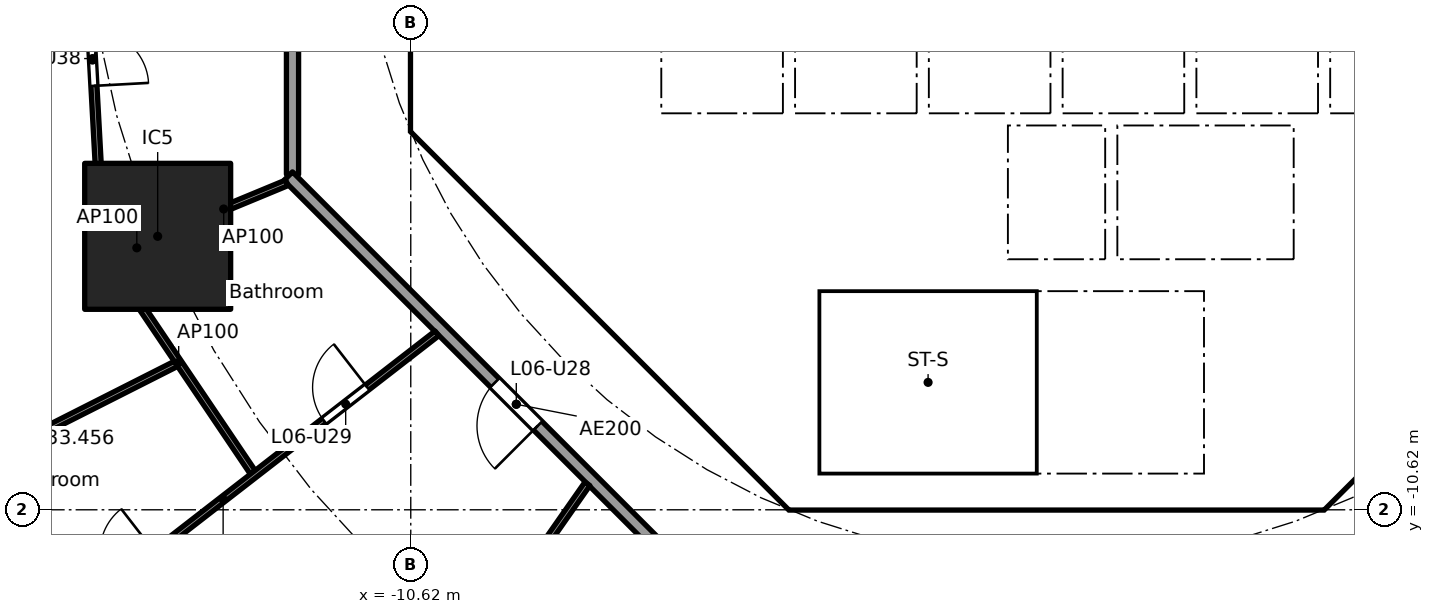
"""IFC4 building model, lengths in metres.
Left out: names, types, materials, properties, quantities, classifications, styles, units other than length and angle.
Written with IfcOpenShell. Run it as: python <this file> out.ifc"""

import sys

from ifc_helpers import new_model, si_unit, direction, frame, frame_2d, origin, origin_2d, place, context, subcontext, project, spatial, polyline, rectangle, outline, extrude, element, fill, save


model = new_model("IFC4")
c1 = context("Model", 3, precision=1e-05, world=origin(), true_north=direction((0.0, 1.0)))
c2 = subcontext(c1, "Body", "Model", "MODEL_VIEW")
j1 = project(units=[si_unit("LENGTHUNIT", "METRE"), si_unit("PLANEANGLEUNIT", "RADIAN")], contexts=[c1])
p1 = place(None, origin())
s1 = spatial("IfcSite", under=j1, at=p1, CompositionType="ELEMENT")
p2 = place(p1, origin())
s2 = spatial("IfcBuilding", under=s1, at=p2, CompositionType="ELEMENT")
p3 = place(p2, frame((0.0, 0.0, 30.7)))
s3 = spatial("IfcBuildingStorey", under=s2, at=p3, CompositionType="ELEMENT", Elevation=30.7)
p4 = place(p3, frame((-14.782, -6.123, 0.0), z_axis=(0.0, 0.0, 1.0), x_axis=(1.0, 0.0, 0.0)))
e1 = element("IfcColumn", 1, at=p4, inside=s3, PredefinedType="COLUMN", context=c2, shape_type="SweptSolid", body=[
    extrude(rectangle(XDim=2.4, YDim=2.4, at=origin_2d()), origin(), (0.0, 0.0, 1.0), 3.7),
])
p5 = place(p3, frame((-10.325, 3.801, 0.0), z_axis=(0.0, 0.0, 1.0), x_axis=(0.0, -1.0, 0.0)))
e2 = element("IfcWall", 2, at=p5, inside=s3, PredefinedType="SHEAR", context=c2, shape_type="SweptSolid", body=[
    extrude(rectangle(XDim=7.602, YDim=0.6, at=frame_2d((3.801, 0.0))), origin(), (0.0, 0.0, 1.0), 3.44),
])
p6 = place(p5, frame((0.651, 0.0, 0.0)))
e3 = element("IfcOpeningElement", 3, at=p6, cuts=e2, PredefinedType="OPENING", context=c2, shape_type="SweptSolid", body=[
    extrude(rectangle(XDim=1.5, YDim=2.1, at=frame_2d((0.75, 1.05))), frame((0.0, 0.31, 0.0), z_axis=(0.0, -1.0, 0.0), x_axis=(1.0, 0.0, 0.0)), (0.0, 0.0, 1.0), 0.62),
])
p7 = place(p5, frame((5.451, 0.0, 0.0)))
e4 = element("IfcOpeningElement", 4, at=p7, cuts=e2, PredefinedType="OPENING", context=c2, shape_type="SweptSolid", body=[
    extrude(rectangle(XDim=1.5, YDim=2.1, at=frame_2d((0.75, 1.05))), frame((0.0, 0.31, 0.0), z_axis=(0.0, -1.0, 0.0), x_axis=(1.0, 0.0, 0.0)), (0.0, 0.0, 1.0), 0.62),
])
p8 = place(p3, frame((-9.988, -4.613, 0.0), z_axis=(0.0, 0.0, 1.0), x_axis=(0.707106781187, -0.707106781187, 0.0)))
e5 = element("IfcWall", 5, at=p8, inside=s3, PredefinedType="SHEAR", context=c2, shape_type="SweptSolid", body=[
    extrude(rectangle(XDim=7.602, YDim=0.6, at=frame_2d((3.801, 0.0))), origin(), (0.0, 0.0, 1.0), 3.44),
])
p9 = place(p8, frame((6.151, 0.0, 0.0)))
e6 = element("IfcOpeningElement", 6, at=p9, cuts=e5, PredefinedType="OPENING", context=c2, shape_type="SweptSolid", body=[
    extrude(rectangle(XDim=1.1, YDim=2.1, at=frame_2d((0.55, 1.05))), frame((0.0, 0.31, 0.0), z_axis=(0.0, -1.0, 0.0), x_axis=(1.0, 0.0, 0.0)), (0.0, 0.0, 1.0), 0.62),
])
p10 = place(p3, frame((4.613, -9.988, 0.0), z_axis=(0.0, 0.0, 1.0), x_axis=(0.707106781187, 0.707106781187, 0.0)))
e7 = element("IfcWall", 7, at=p10, inside=s3, PredefinedType="SHEAR", context=c2, shape_type="SweptSolid", body=[
    extrude(rectangle(XDim=7.602, YDim=0.6, at=frame_2d((3.801, 0.0))), origin(), (0.0, 0.0, 1.0), 3.44),
])
p11 = place(p10, frame((3.201, 0.0, 0.0)))
e8 = element("IfcOpeningElement", 8, at=p11, cuts=e7, PredefinedType="OPENING", context=c2, shape_type="SweptSolid", body=[
    extrude(rectangle(XDim=1.2, YDim=2.1, at=frame_2d((0.6, 1.05))), frame((0.0, 0.31, 0.0), z_axis=(0.0, -1.0, 0.0), x_axis=(1.0, 0.0, 0.0)), (0.0, 0.0, 1.0), 0.62),
])
p12 = place(p3, frame((4.0, -10.025, 0.0), z_axis=(0.0, 0.0, 1.0), x_axis=(0.0, 1.0, 0.0)))
e9 = element("IfcWall", 9, at=p12, inside=s3, PredefinedType="SOLIDWALL", context=c2, shape_type="SweptSolid", body=[
    extrude(rectangle(XDim=3.0, YDim=0.2, at=frame_2d((1.5, 0.0))), origin(), (0.0, 0.0, 1.0), 3.44),
])
p13 = place(p12, frame((0.975, 0.0, 0.0)))
e10 = element("IfcOpeningElement", 10, at=p13, cuts=e9, PredefinedType="OPENING", context=c2, shape_type="SweptSolid", body=[
    extrude(rectangle(XDim=1.1, YDim=2.1, at=frame_2d((0.55, 1.05))), frame((0.0, 0.11, 0.0), z_axis=(0.0, -1.0, 0.0), x_axis=(1.0, 0.0, 0.0)), (0.0, 0.0, 1.0), 0.22),
])
p14 = place(p3, frame((-5.8, -8.227, 0.0), z_axis=(0.0, 0.0, 1.0), x_axis=(0.0, 1.0, 0.0)))
e11 = element("IfcWall", 11, at=p14, inside=s3, PredefinedType="PARTITIONING", context=c2, shape_type="SweptSolid", body=[
    extrude(rectangle(XDim=3.927, YDim=0.15, at=frame_2d((1.963, 0.0))), origin(), (0.0, 0.0, 1.0), 3.44),
])
p15 = place(p14, frame((2.615, 0.0, 0.0)))
e12 = element("IfcOpeningElement", 12, at=p15, cuts=e11, PredefinedType="OPENING", context=c2, shape_type="SweptSolid", body=[
    extrude(rectangle(XDim=0.9, YDim=2.1, at=frame_2d((0.45, 1.05))), frame((0.0, 0.085, 0.0), z_axis=(0.0, -1.0, 0.0), x_axis=(1.0, 0.0, 0.0)), (0.0, 0.0, 1.0), 0.17),
])
p16 = place(p14, frame((0.539, 0.0, 0.0)))
e13 = element("IfcOpeningElement", 13, at=p16, cuts=e11, PredefinedType="OPENING", context=c2, shape_type="SweptSolid", body=[
    extrude(rectangle(XDim=0.9, YDim=2.1, at=frame_2d((0.45, 1.05))), frame((0.0, 0.085, 0.0), z_axis=(0.0, -1.0, 0.0), x_axis=(1.0, 0.0, 0.0)), (0.0, 0.0, 1.0), 0.17),
])
p17 = place(p3, frame((4.0, -6.5, 0.0), z_axis=(0.0, 0.0, 1.0), x_axis=(0.0, 1.0, 0.0)))
e14 = element("IfcWall", 14, at=p17, inside=s3, PredefinedType="SOLIDWALL", context=c2, shape_type="SweptSolid", body=[
    extrude(rectangle(XDim=2.2, YDim=0.2, at=frame_2d((1.1, 0.0))), origin(), (0.0, 0.0, 1.0), 3.44),
])
p18 = place(p17, frame((0.55, 0.0, 0.0)))
e15 = element("IfcOpeningElement", 15, at=p18, cuts=e14, PredefinedType="OPENING", context=c2, shape_type="SweptSolid", body=[
    extrude(rectangle(XDim=1.1, YDim=2.1, at=frame_2d((0.55, 1.05))), frame((0.0, 0.11, 0.0), z_axis=(0.0, -1.0, 0.0), x_axis=(1.0, 0.0, 0.0)), (0.0, 0.0, 1.0), 0.22),
])
p19 = place(p3, frame((-4.0, -6.5, 0.0), z_axis=(0.0, 0.0, 1.0), x_axis=(0.0, 1.0, 0.0)))
e16 = element("IfcWall", 16, at=p19, inside=s3, PredefinedType="SOLIDWALL", context=c2, shape_type="SweptSolid", body=[
    extrude(rectangle(XDim=2.2, YDim=0.2, at=frame_2d((1.1, 0.0))), origin(), (0.0, 0.0, 1.0), 3.44),
])
p20 = place(p19, frame((0.65, 0.0, 0.0)))
e17 = element("IfcOpeningElement", 17, at=p20, cuts=e16, PredefinedType="OPENING", context=c2, shape_type="SweptSolid", body=[
    extrude(rectangle(XDim=0.9, YDim=2.1, at=frame_2d((0.45, 1.05))), frame((0.0, 0.11, 0.0), z_axis=(0.0, -1.0, 0.0), x_axis=(1.0, 0.0, 0.0)), (0.0, 0.0, 1.0), 0.22),
])
p21 = place(p3, origin())
e18 = element("IfcWall", 18, at=p21, inside=s3, PredefinedType="SHEAR", context=c2, shape_type="SweptSolid", body=[
    extrude(outline(polyline([(-10.625, -3.801), (-10.025, -3.801), (-10.025, -4.152), (-9.776, -4.401), (-10.2, -4.825), (-10.625, -4.401), (-10.625, -3.801)])), origin(), (0.0, 0.0, 1.0), 3.44),
])
p22 = place(p3, origin())
e19 = element("IfcWall", 19, at=p22, inside=s3, PredefinedType="SHEAR", context=c2, shape_type="SweptSolid", body=[
    extrude(outline(polyline([(-4.152, -10.025), (4.152, -10.025), (4.401, -9.776), (4.825, -10.2), (4.401, -10.625), (-4.401, -10.625), (-4.825, -10.2), (-4.401, -9.776), (-4.152, -10.025)])), origin(), (0.0, 0.0, 1.0), 3.44),
])
p23 = place(p3, frame((-10.025, -4.0, 0.0), z_axis=(0.0, 0.0, 1.0), x_axis=(1.0, 0.0, 0.0)))
e20 = element("IfcWall", 20, at=p23, inside=s3, PredefinedType="PARTITIONING", context=c2, shape_type="SweptSolid", body=[
    extrude(rectangle(XDim=3.325, YDim=0.2, at=frame_2d((1.662, 0.0))), origin(), (0.0, 0.0, 1.0), 3.44),
])
p24 = place(p3, frame((-8.001, -6.1, 0.0), z_axis=(0.0, 0.0, 1.0), x_axis=(1.0, 0.0, 0.0)))
e21 = element("IfcWall", 21, at=p24, inside=s3, PredefinedType="PARTITIONING", context=c2, shape_type="SweptSolid", body=[
    extrude(rectangle(XDim=2.126, YDim=0.15, at=frame_2d((1.063, 0.0))), origin(), (0.0, 0.0, 1.0), 3.44),
])
for number, where, z_axis, x_axis in (
    (22, (-0.9, -6.5, 0.0), (0.0, 0.0, 1.0), (0.0, 1.0, 0.0)),
    (23, (0.9, -6.5, 0.0), (0.0, 0.0, 1.0), (0.0, 1.0, 0.0)),
):
    element("IfcWall", number, at=place(p3, frame(where, z_axis=z_axis, x_axis=x_axis)), inside=s3, PredefinedType="SOLIDWALL", context=c2, shape_type="SweptSolid", body=[
        extrude(rectangle(XDim=2.2, YDim=0.2, at=frame_2d((1.1, 0.0))), origin(), (0.0, 0.0, 1.0), 3.44),
    ])
p25 = place(p3, origin())
e24 = element("IfcWall", 24, at=p25, inside=s3, PredefinedType="SOLIDWALL", context=c2, shape_type="SweptSolid", body=[
    extrude(outline(polyline([(-6.7, -2.1), (-6.5, -2.1), (-6.5, -4.1), (-4.5, -4.1), (-4.5, -2.1), (-4.3, -2.1), (-4.3, -4.1), (-2.3, -4.1), (-2.3, -2.1), (-2.1, -2.1), (-2.1, -4.1), (-0.1, -4.1), (-0.1, -2.1), (0.1, -2.1), (0.1, -4.1), (2.1, -4.1), (2.1, -2.1), (2.3, -2.1), (2.3, -4.1), (4.3, -4.1), (4.3, -2.1), (4.5, -2.1), (4.5, -4.1), (6.5, -4.1), (6.5, -2.1), (6.7, -2.1), (6.7, -4.3), (-6.7, -4.3), (-6.7, -2.1)])), origin(), (0.0, 0.0, 1.0), 3.44),
])
p26 = place(p3, origin())
e25 = element("IfcWall", 25, at=p26, inside=s3, PredefinedType="SOLIDWALL", context=c2, shape_type="SweptSolid", body=[
    extrude(outline(polyline([(-3.9, -10.025), (-4.1, -10.025), (-4.1, -7.025), (-3.9, -7.025), (-3.9, -10.025)])), origin(), (0.0, 0.0, 1.0), 3.44),
])
p27 = place(p3, origin())
e26 = element("IfcWall", 26, at=p27, inside=s3, PredefinedType="SOLIDWALL", context=c2, shape_type="SweptSolid", body=[
    extrude(outline(polyline([(4.1, -7.025), (-4.1, -7.025), (-4.1, -6.5), (4.1, -6.5), (4.1, -7.025)])), origin(), (0.0, 0.0, 1.0), 3.44),
])
p28 = place(p3, frame((-12.565, 5.304, 0.0), z_axis=(0.0, 0.0, 1.0), x_axis=(0.0, -1.0, 0.0)))
e27 = element("IfcWall", 27, at=p28, inside=s3, PredefinedType="PARTITIONING", context=c2, shape_type="SweptSolid", body=[
    extrude(rectangle(XDim=10.409, YDim=0.2, at=frame_2d((5.205, 0.0))), origin(), (0.0, 0.0, 1.0), 3.44),
])
p29 = place(p3, frame((-12.635, -5.134, 0.0), z_axis=(0.0, 0.0, 1.0), x_axis=(0.707106781187, -0.707106781187, 0.0)))
e28 = element("IfcWall", 28, at=p29, inside=s3, PredefinedType="PARTITIONING", context=c2, shape_type="SweptSolid", body=[
    extrude(rectangle(XDim=10.609, YDim=0.2, at=frame_2d((5.305, 0.0))), origin(), (0.0, 0.0, 1.0), 3.44),
])
p30 = place(p29, frame((4.804, 0.0, 0.0)))
e29 = element("IfcOpeningElement", 29, at=p30, cuts=e28, PredefinedType="OPENING", context=c2, shape_type="SweptSolid", body=[
    extrude(rectangle(XDim=1.0, YDim=2.1, at=frame_2d((0.5, 1.05))), frame((0.0, 0.11, 0.0), z_axis=(0.0, -1.0, 0.0), x_axis=(1.0, 0.0, 0.0)), (0.0, 0.0, 1.0), 0.22),
])
p31 = place(p3, frame((-16.028, -0.05, 0.0), z_axis=(0.0, 0.0, 1.0), x_axis=(0.054636410342, -0.998506315786, 0.0)))
e30 = element("IfcWall", 30, at=p31, inside=s3, PredefinedType="PARTITIONING", context=c2, shape_type="SweptSolid", body=[
    extrude(rectangle(XDim=6.359, YDim=0.1, at=frame_2d((3.179, 0.0))), origin(), (0.0, 0.0, 1.0), 2.756),
])
p32 = place(p31, frame((2.704, 0.0, 0.0)))
e31 = element("IfcOpeningElement", 31, at=p32, cuts=e30, PredefinedType="OPENING", context=c2, shape_type="SweptSolid", body=[
    extrude(rectangle(XDim=0.9, YDim=2.1, at=frame_2d((0.45, 1.05))), frame((0.0, 0.06, 0.0), z_axis=(0.0, -1.0, 0.0), x_axis=(1.0, 0.0, 0.0)), (0.0, 0.0, 1.0), 0.12),
])
p33 = place(p3, frame((-12.657, -5.243, 0.0), z_axis=(0.0, 0.0, 1.0), x_axis=(-0.923864733477, -0.382719158442, 0.0)))
e32 = element("IfcWall", 32, at=p33, inside=s3, PredefinedType="PARTITIONING", context=c2, shape_type="SweptSolid", body=[
    extrude(rectangle(XDim=2.25, YDim=0.1, at=frame_2d((1.125, 0.0))), origin(), (0.0, 0.0, 1.0), 3.44),
])
p34 = place(p3, frame((-15.655, -6.391, 0.0), z_axis=(0.0, 0.0, 1.0), x_axis=(0.559126445155, -0.82908239538, 0.0)))
e33 = element("IfcWall", 33, at=p34, inside=s3, PredefinedType="PARTITIONING", context=c2, shape_type="SweptSolid", body=[
    extrude(rectangle(XDim=4.358, YDim=0.1, at=frame_2d((2.179, 0.0))), origin(), (0.0, 0.0, 1.0), 3.44),
])
p35 = place(p3, frame((-14.481, -8.22, 0.0), z_axis=(0.0, 0.0, 1.0), x_axis=(-0.892232077638, -0.451577146935, 0.0)))
e34 = element("IfcWall", 34, at=p35, inside=s3, PredefinedType="PARTITIONING", context=c2, shape_type="SweptSolid", body=[
    extrude(rectangle(XDim=9.723, YDim=0.1, at=frame_2d((4.862, 0.0))), origin(), (0.0, 0.0, 1.0), 2.837),
])
p36 = place(p35, frame((6.678, 0.0, 0.0)))
e35 = element("IfcOpeningElement", 35, at=p36, cuts=e34, PredefinedType="OPENING", context=c2, shape_type="SweptSolid", body=[
    extrude(rectangle(XDim=0.9, YDim=2.1, at=frame_2d((0.45, 1.05))), frame((0.0, 0.06, 0.0), z_axis=(0.0, -1.0, 0.0), x_axis=(1.0, 0.0, 0.0)), (0.0, 0.0, 1.0), 0.12),
])
p37 = place(p3, frame((-10.19, -7.719, 0.0), z_axis=(0.0, 0.0, 1.0), x_axis=(-0.790264549439, -0.612765813259, 0.0)))
e36 = element("IfcWall", 36, at=p37, inside=s3, PredefinedType="PARTITIONING", context=c2, shape_type="SweptSolid", body=[
    extrude(rectangle(XDim=8.896, YDim=0.1, at=frame_2d((4.448, 0.0))), origin(), (0.0, 0.0, 1.0), 2.687),
])
p38 = place(p37, frame((1.448, 0.0, 0.0)))
e37 = element("IfcOpeningElement", 37, at=p38, cuts=e36, PredefinedType="OPENING", context=c2, shape_type="SweptSolid", body=[
    extrude(rectangle(XDim=0.9, YDim=2.1, at=frame_2d((0.45, 1.05))), frame((0.0, 0.06, 0.0), z_axis=(0.0, -1.0, 0.0), x_axis=(1.0, 0.0, 0.0)), (0.0, 0.0, 1.0), 0.12),
])
p39 = place(p37, frame((5.871, 0.0, 0.0)))
e38 = element("IfcOpeningElement", 38, at=p39, cuts=e36, PredefinedType="OPENING", context=c2, shape_type="SweptSolid", body=[
    extrude(rectangle(XDim=0.9, YDim=2.1, at=frame_2d((0.45, 1.05))), frame((0.0, 0.06, 0.0), z_axis=(0.0, -1.0, 0.0), x_axis=(1.0, 0.0, 0.0)), (0.0, 0.0, 1.0), 0.12),
])
p40 = place(p3, frame((-7.715, -10.193, 0.0), z_axis=(0.0, 0.0, 1.0), x_axis=(-0.573126964124, -0.819466584428, 0.0)))
e39 = element("IfcWall", 39, at=p40, inside=s3, PredefinedType="PARTITIONING", context=c2, shape_type="SweptSolid", body=[
    extrude(rectangle(XDim=15.001, YDim=0.1, at=frame_2d((7.5, 0.0))), origin(), (0.0, 0.0, 1.0), 2.687),
])
p41 = place(p40, frame((1.678, 0.0, 0.0)))
e40 = element("IfcOpeningElement", 40, at=p41, cuts=e39, PredefinedType="OPENING", context=c2, shape_type="SweptSolid", body=[
    extrude(rectangle(XDim=0.9, YDim=2.1, at=frame_2d((0.45, 1.05))), frame((0.0, 0.06, 0.0), z_axis=(0.0, -1.0, 0.0), x_axis=(1.0, 0.0, 0.0)), (0.0, 0.0, 1.0), 0.12),
])
p42 = place(p40, frame((6.631, 0.0, 0.0)))
e41 = element("IfcOpeningElement", 41, at=p42, cuts=e39, PredefinedType="OPENING", context=c2, shape_type="SweptSolid", body=[
    extrude(rectangle(XDim=0.9, YDim=2.1, at=frame_2d((0.45, 1.05))), frame((0.0, 0.06, 0.0), z_axis=(0.0, -1.0, 0.0), x_axis=(1.0, 0.0, 0.0)), (0.0, 0.0, 1.0), 0.12),
])
p43 = place(p3, frame((-15.469, -6.398, 0.0), z_axis=(0.0, 0.0, 1.0), x_axis=(0.969858002632, 0.243670791706, 0.0)))
e42 = element("IfcWall", 42, at=p43, inside=s3, PredefinedType="PARTITIONING", context=c2, shape_type="SweptSolid", body=[
    extrude(rectangle(XDim=0.708, YDim=0.1, at=frame_2d((0.354, 0.0))), origin(), (0.0, 0.0, 1.0), 3.44),
])
p44 = place(p18, origin())
e43 = element("IfcDoor", 43, at=p44, inside=s3, OperationType="DOUBLE_DOOR_SLIDING", PredefinedType="DOOR", context=c2, shape_type="SweptSolid", body=[
    extrude(rectangle(XDim=1.1, YDim=2.1, at=frame_2d((0.55, 1.05))), frame((0.0, 0.025, 0.0), z_axis=(0.0, -1.0, 0.0), x_axis=(1.0, 0.0, 0.0)), (0.0, 0.0, 1.0), 0.05),
])
fill(e15, e43)
p45 = place(p13, origin())
e44 = element("IfcDoor", 44, at=p45, inside=s3, OperationType="SINGLE_SWING_LEFT", PredefinedType="DOOR", context=c2, shape_type="SweptSolid", body=[
    extrude(rectangle(XDim=1.1, YDim=2.1, at=frame_2d((0.55, 1.05))), frame((0.0, 0.025, 0.0), z_axis=(0.0, -1.0, 0.0), x_axis=(1.0, 0.0, 0.0)), (0.0, 0.0, 1.0), 0.05),
])
fill(e10, e44)
p46 = place(p15, origin())
e45 = element("IfcDoor", 45, at=p46, inside=s3, OperationType="SINGLE_SWING_LEFT", PredefinedType="DOOR", context=c2, shape_type="SweptSolid", body=[
    extrude(rectangle(XDim=0.9, YDim=2.1, at=frame_2d((0.45, 1.05))), frame((0.0, 0.025, 0.0), z_axis=(0.0, -1.0, 0.0), x_axis=(1.0, 0.0, 0.0)), (0.0, 0.0, 1.0), 0.05),
])
fill(e12, e45)
p47 = place(p16, origin())
e46 = element("IfcDoor", 46, at=p47, inside=s3, OperationType="SINGLE_SWING_LEFT", PredefinedType="DOOR", context=c2, shape_type="SweptSolid", body=[
    extrude(rectangle(XDim=0.9, YDim=2.1, at=frame_2d((0.45, 1.05))), frame((0.0, 0.025, 0.0), z_axis=(0.0, -1.0, 0.0), x_axis=(1.0, 0.0, 0.0)), (0.0, 0.0, 1.0), 0.05),
])
fill(e13, e46)
p48 = place(p20, frame((0.9, 0.0, 0.0), x_axis=(-1.0, 0.0, 0.0)))
e47 = element("IfcDoor", 47, at=p48, inside=s3, OperationType="SINGLE_SWING_RIGHT", PredefinedType="DOOR", context=c2, shape_type="SweptSolid", body=[
    extrude(rectangle(XDim=0.9, YDim=2.1, at=frame_2d((0.45, 1.05))), frame((0.0, 0.025, 0.0), z_axis=(0.0, -1.0, 0.0), x_axis=(1.0, 0.0, 0.0)), (0.0, 0.0, 1.0), 0.05),
])
fill(e17, e47)
p49 = place(p7, origin())
e48 = element("IfcDoor", 48, at=p49, inside=s3, OperationType="DOUBLE_DOOR_SINGLE_SWING", PredefinedType="DOOR", context=c2, shape_type="SweptSolid", body=[
    extrude(rectangle(XDim=1.5, YDim=2.1, at=frame_2d((0.75, 1.05))), frame((0.0, 0.025, 0.0), z_axis=(0.0, -1.0, 0.0), x_axis=(1.0, 0.0, 0.0)), (0.0, 0.0, 1.0), 0.05),
])
fill(e4, e48)
p50 = place(p9, origin())
e49 = element("IfcDoor", 49, at=p50, inside=s3, OperationType="SINGLE_SWING_RIGHT", PredefinedType="DOOR", context=c2, shape_type="SweptSolid", body=[
    extrude(rectangle(XDim=1.1, YDim=2.1, at=frame_2d((0.55, 1.05))), frame((0.0, 0.025, 0.0), z_axis=(0.0, -1.0, 0.0), x_axis=(1.0, 0.0, 0.0)), (0.0, 0.0, 1.0), 0.05),
])
fill(e6, e49)
p51 = place(p30, frame((1.0, 0.0, 0.0), x_axis=(-1.0, 0.0, 0.0)))
e50 = element("IfcDoor", 50, at=p51, inside=s3, OperationType="SINGLE_SWING_LEFT", PredefinedType="DOOR", context=c2, shape_type="SweptSolid", body=[
    extrude(rectangle(XDim=1.0, YDim=2.1, at=frame_2d((0.5, 1.05))), frame((0.0, 0.025, 0.0), z_axis=(0.0, -1.0, 0.0), x_axis=(1.0, 0.0, 0.0)), (0.0, 0.0, 1.0), 0.05),
])
fill(e29, e50)
p52 = place(p38, frame((0.9, 0.0, 0.0), x_axis=(-1.0, 0.0, 0.0)))
e51 = element("IfcDoor", 51, at=p52, inside=s3, OperationType="SINGLE_SWING_RIGHT", PredefinedType="DOOR", context=c2, shape_type="SweptSolid", body=[
    extrude(rectangle(XDim=0.9, YDim=2.1, at=frame_2d((0.45, 1.05))), frame((0.0, 0.025, 0.0), z_axis=(0.0, -1.0, 0.0), x_axis=(1.0, 0.0, 0.0)), (0.0, 0.0, 1.0), 0.05),
])
fill(e37, e51)
p53 = place(p32, origin())
e52 = element("IfcDoor", 52, at=p53, inside=s3, OperationType="SINGLE_SWING_RIGHT", PredefinedType="DOOR", context=c2, shape_type="SweptSolid", body=[
    extrude(rectangle(XDim=0.9, YDim=2.1, at=frame_2d((0.45, 1.05))), frame((0.0, 0.025, 0.0), z_axis=(0.0, -1.0, 0.0), x_axis=(1.0, 0.0, 0.0)), (0.0, 0.0, 1.0), 0.05),
])
fill(e31, e52)
save(model, sys.argv[1])
